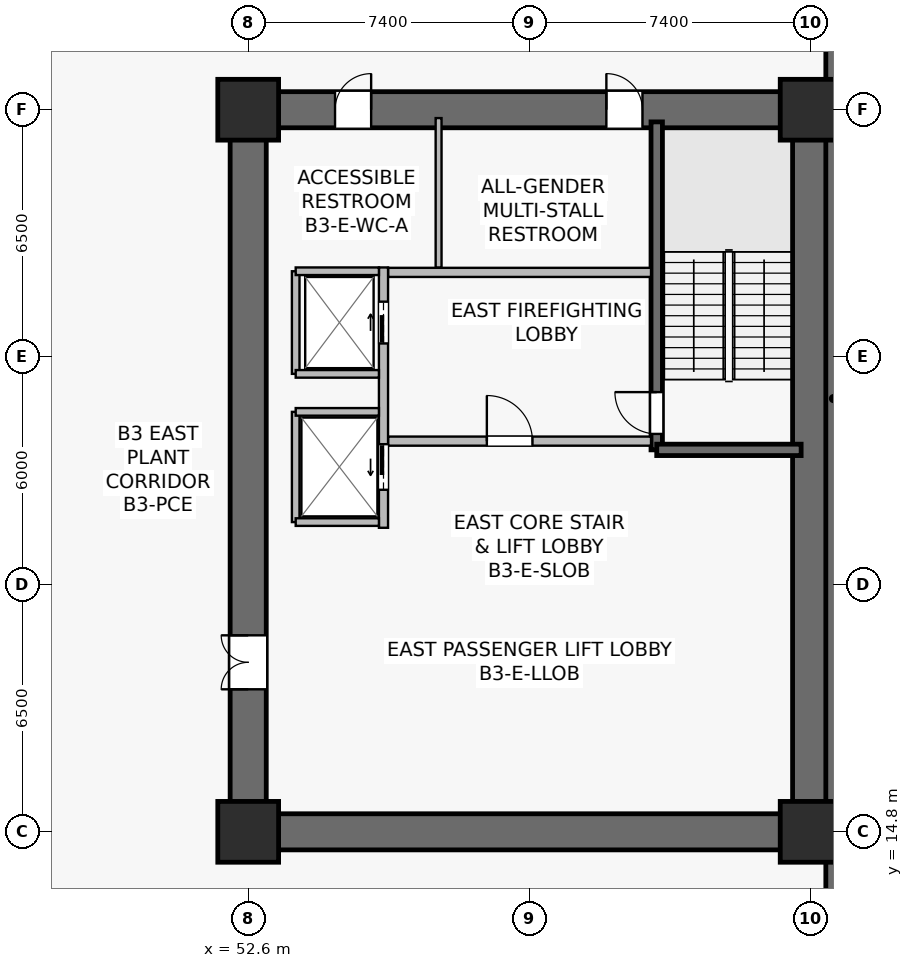
"""IFC4 building model, lengths in metres.
Left out: names, types, materials, properties, quantities, classifications, styles, units other than length and angle.
Written with IfcOpenShell. Run it as: python <this file> out.ifc"""

import sys

from ifc_helpers import new_model, si_unit, direction, frame, frame_2d, origin, origin_2d, place, context, subcontext, project, spatial, rectangle, extrude, source, transform, mapped, element, fill, save


model = new_model("IFC4")
c1 = context("Model", 3, precision=1e-05, world=origin(), true_north=direction((0.0, 1.0)))
c2 = subcontext(c1, "Body", "Model", "MODEL_VIEW")
j1 = project(units=[si_unit("LENGTHUNIT", "METRE"), si_unit("PLANEANGLEUNIT", "RADIAN")], contexts=[c1])
p1 = place(None, origin())
s1 = spatial("IfcSite", under=j1, at=p1, CompositionType="ELEMENT")
p2 = place(p1, origin())
s2 = spatial("IfcBuilding", under=s1, at=p2, CompositionType="ELEMENT")
p3 = place(p2, frame((0.0, 0.0, -14.4)))
s3 = spatial("IfcBuildingStorey", under=s2, at=p3, CompositionType="ELEMENT", Elevation=-14.4)
p4 = place(p3, frame((52.125, 14.8, 0.0), z_axis=(0.0, 0.0, 1.0), x_axis=(1.0, 0.0, 0.0)))
e1 = element("IfcWall", 1, at=p4, inside=s3, PredefinedType="SHEAR", context=c2, shape_type="SweptSolid", body=[
    extrude(rectangle(XDim=15.75, YDim=0.95, at=frame_2d((7.875, 0.0))), origin(), (0.0, 0.0, 1.0), 4.42),
])
p5 = place(p3, frame((52.125, 33.8, 0.0), z_axis=(0.0, 0.0, 1.0), x_axis=(1.0, 0.0, 0.0)))
e2 = element("IfcWall", 2, at=p5, inside=s3, PredefinedType="SHEAR", context=c2, shape_type="SweptSolid", body=[
    extrude(rectangle(XDim=15.75, YDim=0.95, at=frame_2d((7.875, 0.0))), origin(), (0.0, 0.0, 1.0), 4.42),
])
p6 = place(p5, frame((9.9, 0.0, 0.0)))
e3 = element("IfcOpeningElement", 3, at=p6, cuts=e2, PredefinedType="OPENING", context=c2, shape_type="SweptSolid", body=[
    extrude(rectangle(XDim=0.95, YDim=2.15, at=frame_2d((0.475, 1.075))), frame((0.0, 0.485, 0.0), z_axis=(0.0, -1.0, 0.0), x_axis=(1.0, 0.0, 0.0)), (0.0, 0.0, 1.0), 0.97),
])
p7 = place(p5, frame((2.76, 0.0, 0.0)))
e4 = element("IfcOpeningElement", 4, at=p7, cuts=e2, PredefinedType="OPENING", context=c2, shape_type="SweptSolid", body=[
    extrude(rectangle(XDim=0.95, YDim=2.15, at=frame_2d((0.475, 1.075))), frame((0.0, 0.485, 0.0), z_axis=(0.0, -1.0, 0.0), x_axis=(1.0, 0.0, 0.0)), (0.0, 0.0, 1.0), 0.97),
])
p8 = place(p3, frame((52.6, 15.275, 0.0), z_axis=(0.0, 0.0, 1.0), x_axis=(0.0, 1.0, 0.0)))
e5 = element("IfcWall", 5, at=p8, inside=s3, PredefinedType="SHEAR", context=c2, shape_type="SweptSolid", body=[
    extrude(rectangle(XDim=18.05, YDim=0.95, at=frame_2d((9.025, 0.0))), origin(), (0.0, 0.0, 1.0), 4.42),
])
p9 = place(p8, frame((3.275, 0.0, 0.0)))
e6 = element("IfcOpeningElement", 6, at=p9, cuts=e5, PredefinedType="OPENING", context=c2, shape_type="SweptSolid", body=[
    extrude(rectangle(XDim=1.42, YDim=2.2, at=frame_2d((0.71, 1.1))), frame((0.0, 0.485, 0.0), z_axis=(0.0, -1.0, 0.0), x_axis=(1.0, 0.0, 0.0)), (0.0, 0.0, 1.0), 0.97),
])
p10 = place(p3, frame((67.4, 15.275, 0.0), z_axis=(0.0, 0.0, 1.0), x_axis=(0.0, 1.0, 0.0)))
e7 = element("IfcWall", 7, at=p10, inside=s3, PredefinedType="SHEAR", context=c2, shape_type="SweptSolid", body=[
    extrude(rectangle(XDim=18.05, YDim=0.95, at=frame_2d((9.025, 0.0))), origin(), (0.0, 0.0, 1.0), 4.42),
])
p11 = place(p3, frame((63.35, 24.85, 0.0), z_axis=(0.0, 0.0, 1.0), x_axis=(0.0, 1.0, 0.0)))
e8 = element("IfcWall", 8, at=p11, inside=s3, PredefinedType="SHEAR", context=c2, shape_type="SweptSolid", body=[
    extrude(rectangle(XDim=8.63, YDim=0.3, at=frame_2d((4.315, 0.0))), origin(), (0.0, 0.0, 1.0), 4.42),
])
p12 = place(p11, frame((0.42, 0.0, 0.0)))
e9 = element("IfcOpeningElement", 9, at=p12, cuts=e8, PredefinedType="OPENING", context=c2, shape_type="SweptSolid", body=[
    extrude(rectangle(XDim=1.1, YDim=2.15, at=frame_2d((0.55, 1.075))), frame((0.0, 0.16, 0.0), z_axis=(0.0, -1.0, 0.0), x_axis=(1.0, 0.0, 0.0)), (0.0, 0.0, 1.0), 0.32),
])
p13 = place(p3, frame((63.35, 24.85, 0.0), z_axis=(0.0, 0.0, 1.0), x_axis=(1.0, 0.0, 0.0)))
e10 = element("IfcWall", 10, at=p13, inside=s3, PredefinedType="SHEAR", context=c2, shape_type="SweptSolid", body=[
    extrude(rectangle(XDim=3.8, YDim=0.3, at=frame_2d((1.9, 0.0))), origin(), (0.0, 0.0, 1.0), 4.42),
])
p14 = place(p3, frame((68.0, 6.0, 0.0), z_axis=(0.0, 0.0, 1.0), x_axis=(0.0, 1.0, 0.0)))
e11 = element("IfcWall", 11, at=p14, inside=s3, PredefinedType="SHEAR", context=c2, shape_type="SweptSolid", body=[
    extrude(rectangle(XDim=40.4, YDim=0.4, at=frame_2d((20.2, 0.0))), origin(), (0.0, 0.0, 1.0), 4.42),
])
m1 = source(origin(), c2, "Body", "SweptSolid", [
    extrude(rectangle(XDim=1.6, YDim=1.6, at=origin_2d()), origin(), (0.0, 0.0, 1.0), 4.8),
])
for number, where, z_axis, x_axis in (
    (12, (52.6, 14.8, 0.0), (0.0, 0.0, 1.0), (1.0, 0.0, 0.0)),
    (13, (67.4, 14.8, 0.0), (0.0, 0.0, 1.0), (1.0, 0.0, 0.0)),
    (14, (52.6, 33.8, 0.0), (0.0, 0.0, 1.0), (1.0, 0.0, 0.0)),
    (15, (67.4, 33.8, 0.0), (0.0, 0.0, 1.0), (1.0, 0.0, 0.0)),
):
    element("IfcColumn", number, at=place(p3, frame(where, z_axis=z_axis, x_axis=x_axis)), inside=s3, PredefinedType="COLUMN", context=c2, shape_type="MappedRepresentation", body=[
        mapped(m1, transform((0.0, 0.0, 0.0), scale=1.0)),
    ])
p15 = place(p3, frame((56.28, 25.08, 0.0), z_axis=(0.0, 0.0, 1.0), x_axis=(1.0, 0.0, 0.0)))
e16 = element("IfcWall", 16, at=p15, inside=s3, PredefinedType="SOLIDWALL", context=c2, shape_type="SweptSolid", body=[
    extrude(rectangle(XDim=6.92, YDim=0.24, at=frame_2d((3.46, 0.0))), origin(), (0.0, 0.0, 1.0), 3.655),
])
p16 = place(p15, frame((2.6, 0.0, 0.0)))
e17 = element("IfcOpeningElement", 17, at=p16, cuts=e16, PredefinedType="OPENING", context=c2, shape_type="SweptSolid", body=[
    extrude(rectangle(XDim=1.2, YDim=2.16, at=frame_2d((0.6, 1.08))), frame((0.0, 0.13, 0.0), z_axis=(0.0, -1.0, 0.0), x_axis=(1.0, 0.0, 0.0)), (0.0, 0.0, 1.0), 0.26),
])
p17 = place(p3, frame((56.28, 29.52, 0.0), z_axis=(0.0, 0.0, 1.0), x_axis=(1.0, 0.0, 0.0)))
e18 = element("IfcWall", 18, at=p17, inside=s3, PredefinedType="SOLIDWALL", context=c2, shape_type="SweptSolid", body=[
    extrude(rectangle(XDim=6.92, YDim=0.24, at=frame_2d((3.46, 0.0))), origin(), (0.0, 0.0, 1.0), 3.655),
])
p18 = place(p3, frame((56.16, 22.8, 0.0), z_axis=(0.0, 0.0, 1.0), x_axis=(0.0, 1.0, 0.0)))
e19 = element("IfcWall", 19, at=p18, inside=s3, PredefinedType="SOLIDWALL", context=c2, shape_type="SweptSolid", body=[
    extrude(rectangle(XDim=6.85, YDim=0.24, at=frame_2d((3.425, 0.0))), origin(), (0.0, 0.0, 1.0), 3.505),
])
p19 = place(p18, frame((4.85, 0.0, 0.0)))
e20 = element("IfcOpeningElement", 20, at=p19, cuts=e19, PredefinedType="OPENING", context=c2, shape_type="SweptSolid", body=[
    extrude(rectangle(XDim=1.1, YDim=2.22, at=frame_2d((0.55, 1.11))), frame((0.0, 0.13, 0.0), z_axis=(0.0, -1.0, 0.0), x_axis=(1.0, 0.0, 0.0)), (0.0, 0.0, 1.0), 0.26),
])
p20 = place(p18, frame((1.0, 0.0, 0.0)))
e21 = element("IfcOpeningElement", 21, at=p20, cuts=e19, PredefinedType="OPENING", context=c2, shape_type="SweptSolid", body=[
    extrude(rectangle(XDim=1.2, YDim=2.22, at=frame_2d((0.6, 1.11))), frame((0.0, 0.13, 0.0), z_axis=(0.0, -1.0, 0.0), x_axis=(1.0, 0.0, 0.0)), (0.0, 0.0, 1.0), 0.26),
])
p21 = place(p3, frame((53.85, 26.85, 0.0), z_axis=(0.0, 0.0, 1.0), x_axis=(0.0, 1.0, 0.0)))
e22 = element("IfcWall", 22, at=p21, inside=s3, PredefinedType="SOLIDWALL", context=c2, shape_type="SweptSolid", body=[
    extrude(rectangle(XDim=2.7, YDim=0.2, at=frame_2d((1.35, 0.0))), origin(), (0.0, 0.0, 1.0), 4.42),
])
p22 = place(p3, frame((53.85, 29.55, 0.0), z_axis=(0.0, 0.0, 1.0), x_axis=(1.0, 0.0, 0.0)))
e23 = element("IfcWall", 23, at=p22, inside=s3, PredefinedType="SOLIDWALL", context=c2, shape_type="SweptSolid", body=[
    extrude(rectangle(XDim=2.19, YDim=0.2, at=frame_2d((1.095, 0.0))), origin(), (0.0, 0.0, 1.0), 4.42),
])
p23 = place(p3, frame((53.85, 26.85, 0.0), z_axis=(0.0, 0.0, 1.0), x_axis=(1.0, 0.0, 0.0)))
e24 = element("IfcWall", 24, at=p23, inside=s3, PredefinedType="SOLIDWALL", context=c2, shape_type="SweptSolid", body=[
    extrude(rectangle(XDim=2.19, YDim=0.2, at=frame_2d((1.095, 0.0))), origin(), (0.0, 0.0, 1.0), 3.817),
])
p24 = place(p3, frame((53.85, 22.95, 0.0), z_axis=(0.0, 0.0, 1.0), x_axis=(0.0, 1.0, 0.0)))
e25 = element("IfcWall", 25, at=p24, inside=s3, PredefinedType="SOLIDWALL", context=c2, shape_type="SweptSolid", body=[
    extrude(rectangle(XDim=2.9, YDim=0.2, at=frame_2d((1.45, 0.0))), origin(), (0.0, 0.0, 1.0), 3.505),
])
for number, where, z_axis, x_axis in (
    (26, (53.85, 25.85, 0.0), (0.0, 0.0, 1.0), (1.0, 0.0, 0.0)),
    (27, (53.85, 22.95, 0.0), (0.0, 0.0, 1.0), (1.0, 0.0, 0.0)),
):
    element("IfcWall", number, at=place(p3, frame(where, z_axis=z_axis, x_axis=x_axis)), inside=s3, PredefinedType="SOLIDWALL", context=c2, shape_type="SweptSolid", body=[
        extrude(rectangle(XDim=2.19, YDim=0.2, at=frame_2d((1.095, 0.0))), origin(), (0.0, 0.0, 1.0), 4.42),
    ])
p25 = place(p3, frame((57.61, 29.65, 0.0), z_axis=(0.0, 0.0, 1.0), x_axis=(0.0, 1.0, 0.0)))
e28 = element("IfcWall", 28, at=p25, inside=s3, PredefinedType="PLUMBINGWALL", context=c2, shape_type="SweptSolid", body=[
    extrude(rectangle(XDim=3.93, YDim=0.155, at=frame_2d((1.965, 0.0))), origin(), (0.0, 0.0, 1.0), 4.42),
])
m2 = source(origin(), c2, "Body", "SweptSolid", [
    extrude(rectangle(XDim=1.1, YDim=2.15, at=frame_2d((0.55, 1.075))), frame((0.0, 0.025, 0.0), z_axis=(0.0, -1.0, 0.0), x_axis=(1.0, 0.0, 0.0)), (0.0, 0.0, 1.0), 0.05),
])
p26 = place(p12, origin())
e29 = element("IfcDoor", 29, at=p26, inside=s3, OperationType="SINGLE_SWING_RIGHT", PredefinedType="DOOR", context=c2, shape_type="MappedRepresentation", body=[
    mapped(m2, transform((0.0, 0.0, 0.0), scale=1.0)),
])
fill(e9, e29)
m3 = source(origin(), c2, "Body", "SweptSolid", [
    extrude(rectangle(XDim=1.2, YDim=2.16, at=frame_2d((0.6, 1.08))), frame((0.0, 0.025, 0.0), z_axis=(0.0, -1.0, 0.0), x_axis=(1.0, 0.0, 0.0)), (0.0, 0.0, 1.0), 0.05),
])
p27 = place(p16, origin())
e30 = element("IfcDoor", 30, at=p27, inside=s3, OperationType="SINGLE_SWING_LEFT", PredefinedType="DOOR", context=c2, shape_type="MappedRepresentation", body=[
    mapped(m3, transform((0.0, 0.0, 0.0), scale=1.0)),
])
fill(e17, e30)
m4 = source(origin(), c2, "Body", "SweptSolid", [
    extrude(rectangle(XDim=1.1, YDim=2.22, at=frame_2d((0.55, 1.11))), frame((0.0, 0.025, 0.0), z_axis=(0.0, -1.0, 0.0), x_axis=(1.0, 0.0, 0.0)), (0.0, 0.0, 1.0), 0.05),
])
p28 = place(p19, origin())
e31 = element("IfcDoor", 31, at=p28, inside=s3, OperationType="SLIDING_TO_RIGHT", PredefinedType="USERDEFINED", context=c2, shape_type="MappedRepresentation", body=[
    mapped(m4, transform((0.0, 0.0, 0.0), scale=1.0)),
])
fill(e20, e31)
m5 = source(origin(), c2, "Body", "SweptSolid", [
    extrude(rectangle(XDim=1.2, YDim=2.22, at=frame_2d((0.6, 1.11))), frame((0.0, 0.025, 0.0), z_axis=(0.0, -1.0, 0.0), x_axis=(1.0, 0.0, 0.0)), (0.0, 0.0, 1.0), 0.05),
])
p29 = place(p20, origin())
e32 = element("IfcDoor", 32, at=p29, inside=s3, OperationType="SLIDING_TO_LEFT", PredefinedType="USERDEFINED", context=c2, shape_type="MappedRepresentation", body=[
    mapped(m5, transform((0.0, 0.0, 0.0), scale=1.0)),
])
fill(e21, e32)
m6 = source(origin(), c2, "Body", "SweptSolid", [
    extrude(rectangle(XDim=1.42, YDim=2.2, at=frame_2d((0.71, 1.1))), frame((0.0, 0.025, 0.0), z_axis=(0.0, -1.0, 0.0), x_axis=(1.0, 0.0, 0.0)), (0.0, 0.0, 1.0), 0.05),
])
p30 = place(p9, origin())
e33 = element("IfcDoor", 33, at=p30, inside=s3, OperationType="DOUBLE_DOOR_SINGLE_SWING", PredefinedType="DOOR", context=c2, shape_type="MappedRepresentation", body=[
    mapped(m6, transform((0.0, 0.0, 0.0), scale=1.0)),
])
fill(e6, e33)
m7 = source(origin(), c2, "Body", "SweptSolid", [
    extrude(rectangle(XDim=0.95, YDim=2.15, at=frame_2d((0.475, 1.075))), frame((0.0, 0.025, 0.0), z_axis=(0.0, -1.0, 0.0), x_axis=(1.0, 0.0, 0.0)), (0.0, 0.0, 1.0), 0.05),
])
p31 = place(p6, origin())
e34 = element("IfcDoor", 34, at=p31, inside=s3, OperationType="SINGLE_SWING_LEFT", PredefinedType="DOOR", context=c2, shape_type="MappedRepresentation", body=[
    mapped(m7, transform((0.0, 0.0, 0.0), scale=1.0)),
])
fill(e3, e34)
p32 = place(p7, origin())
e35 = element("IfcDoor", 35, at=p32, inside=s3, OperationType="SINGLE_SWING_RIGHT", PredefinedType="DOOR", context=c2, shape_type="MappedRepresentation", body=[
    mapped(m7, transform((0.0, 0.0, 0.0), scale=1.0)),
])
fill(e4, e35)
save(model, sys.argv[1])
